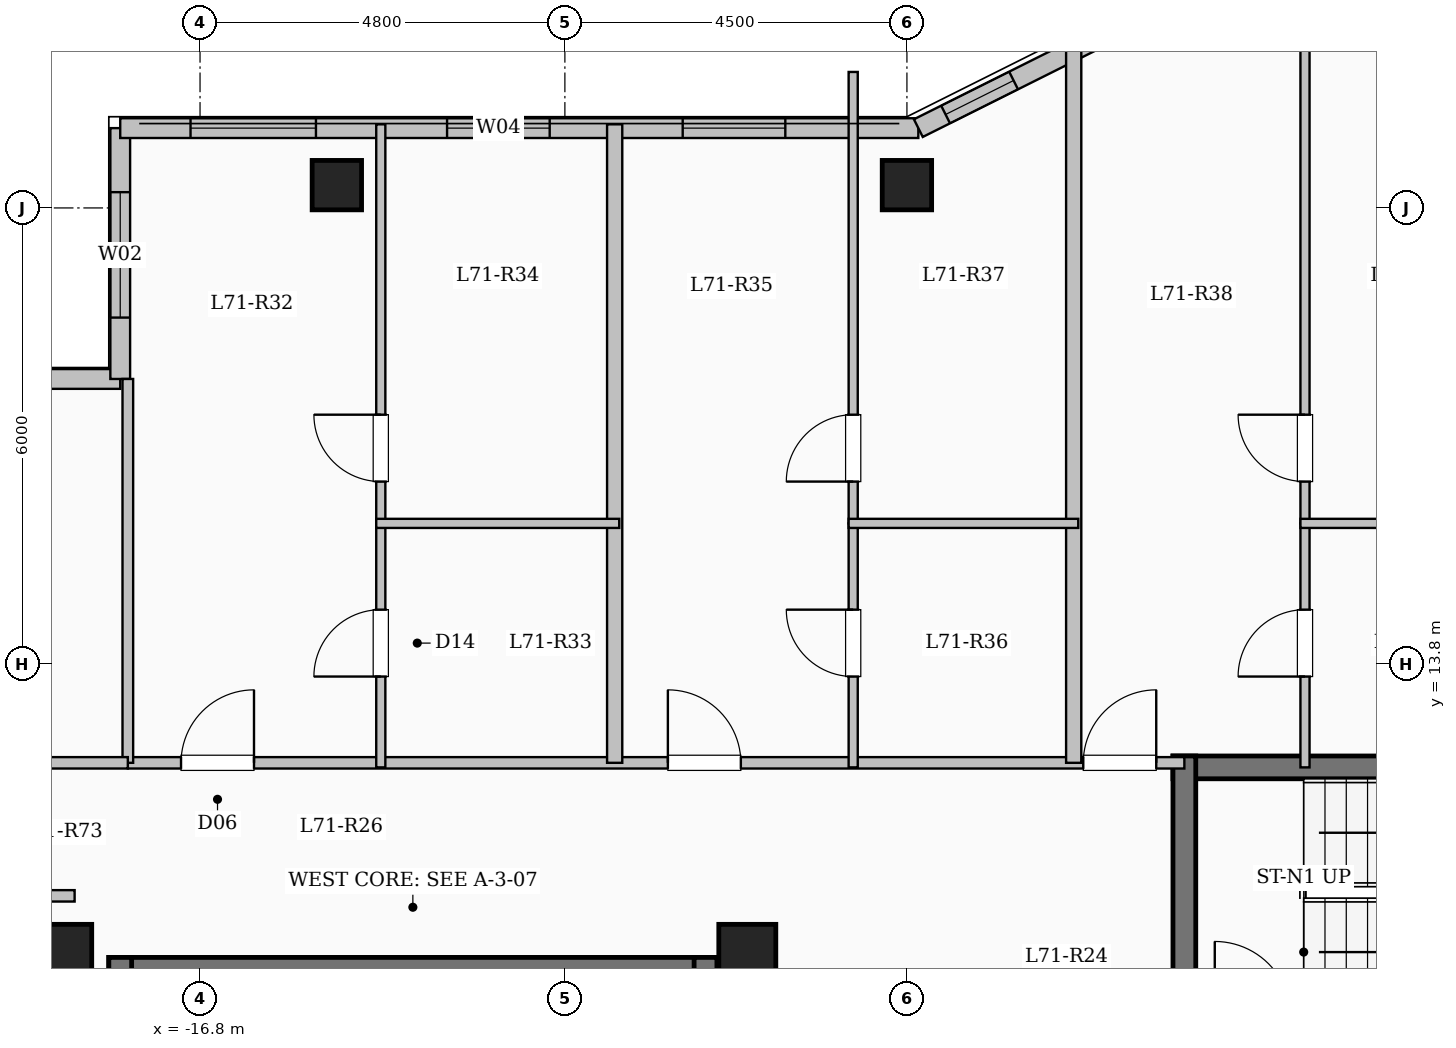
"""IFC4 building model, lengths in metres.
Left out: names, types, materials, properties, quantities, classifications, styles, units other than length and angle.
Written with IfcOpenShell. Run it as: python <this file> out.ifc"""

import sys

from ifc_helpers import new_model, si_unit, direction, frame, frame_2d, origin, origin_2d, place, context, subcontext, project, spatial, rectangle, extrude, element, fill, save


model = new_model("IFC4")
c1 = context("Model", 3, precision=1e-05, world=origin(), true_north=direction((0.0, 1.0)))
c2 = subcontext(c1, "Body", "Model", "MODEL_VIEW")
j1 = project(units=[si_unit("LENGTHUNIT", "METRE"), si_unit("PLANEANGLEUNIT", "RADIAN")], contexts=[c1])
p1 = place(None, origin())
s1 = spatial("IfcSite", under=j1, at=p1, CompositionType="ELEMENT")
p2 = place(p1, origin())
s2 = spatial("IfcBuilding", under=s1, at=p2, CompositionType="ELEMENT")
p3 = place(p2, frame((0.0, 0.0, 261.6)))
s3 = spatial("IfcBuildingStorey", under=s2, at=p3, CompositionType="ELEMENT", Elevation=261.6)
for number, where, z_axis, x_axis in (
    (1, (-9.6, 10.0, 0.0), (0.0, 0.0, 1.0), (1.0, 0.0, 0.0)),
    (2, (-18.6, 10.0, 0.0), (0.0, 0.0, 1.0), (1.0, 0.0, 0.0)),
):
    element("IfcColumn", number, at=place(p3, frame(where, z_axis=z_axis, x_axis=x_axis)), inside=s3, PredefinedType="COLUMN", context=c2, shape_type="SweptSolid", body=[
        extrude(rectangle(XDim=0.75, YDim=0.75, at=origin_2d()), origin(), (0.0, 0.0, 1.0), 3.35),
    ])
for number, where, z_axis, x_axis in (
    (3, (-15.0, 20.1, 0.0), (0.0, 0.0, 1.0), (1.0, 0.0, 0.0)),
    (4, (-7.5, 20.1, 0.0), (0.0, 0.0, 1.0), (1.0, 0.0, 0.0)),
):
    element("IfcColumn", number, at=place(p3, frame(where, z_axis=z_axis, x_axis=x_axis)), inside=s3, PredefinedType="COLUMN", context=c2, shape_type="SweptSolid", body=[
        extrude(rectangle(XDim=0.65, YDim=0.65, at=origin_2d()), origin(), (0.0, 0.0, 1.0), 3.35),
    ])
p4 = place(p3, frame((-22.65, 17.55, 0.0), z_axis=(0.0, 0.0, 1.0), x_axis=(1.0, 0.0, 0.0)))
e5 = element("IfcWall", 5, at=p4, inside=s3, PredefinedType="SOLIDWALL", context=c2, shape_type="SweptSolid", body=[
    extrude(rectangle(XDim=4.8, YDim=0.26, at=frame_2d((2.4, 0.0))), origin(), (0.0, 0.0, 1.0), 3.1),
])
p5 = place(p4, frame((1.425, 0.0, 0.9)))
e6 = element("IfcOpeningElement", 6, at=p5, cuts=e5, PredefinedType="OPENING", context=c2, shape_type="SweptSolid", body=[
    extrude(rectangle(XDim=2.0, YDim=1.7, at=frame_2d((1.0, 0.85))), frame((0.0, 0.14, 0.0), z_axis=(0.0, -1.0, 0.0), x_axis=(1.0, 0.0, 0.0)), (0.0, 0.0, 1.0), 0.28),
])
p6 = place(p3, frame((-17.85, 17.55, 0.0), z_axis=(0.0, 0.0, 1.0), x_axis=(0.0, 1.0, 0.0)))
e7 = element("IfcWall", 7, at=p6, inside=s3, PredefinedType="SOLIDWALL", context=c2, shape_type="SweptSolid", body=[
    extrude(rectangle(XDim=3.3, YDim=0.26, at=frame_2d((1.65, 0.0))), origin(), (0.0, 0.0, 1.0), 3.1),
])
p7 = place(p6, frame((0.808, 0.0, 0.9)))
e8 = element("IfcOpeningElement", 8, at=p7, cuts=e7, PredefinedType="OPENING", context=c2, shape_type="SweptSolid", body=[
    extrude(rectangle(XDim=1.65, YDim=1.6, at=frame_2d((0.825, 0.8))), frame((0.0, 0.14, 0.0), z_axis=(0.0, -1.0, 0.0), x_axis=(1.0, 0.0, 0.0)), (0.0, 0.0, 1.0), 0.28),
])
p8 = place(p3, frame((-17.85, 20.85, 0.0), z_axis=(0.0, 0.0, 1.0), x_axis=(1.0, 0.0, 0.0)))
e9 = element("IfcWall", 9, at=p8, inside=s3, PredefinedType="SOLIDWALL", context=c2, shape_type="SweptSolid", body=[
    extrude(rectangle(XDim=10.5, YDim=0.26, at=frame_2d((5.25, 0.0))), origin(), (0.0, 0.0, 1.0), 3.1),
])
p9 = place(p8, frame((0.925, 0.0, 0.9)))
e10 = element("IfcOpeningElement", 10, at=p9, cuts=e9, PredefinedType="OPENING", context=c2, shape_type="SweptSolid", body=[
    extrude(rectangle(XDim=1.65, YDim=1.6, at=frame_2d((0.825, 0.8))), frame((0.0, 0.14, 0.0), z_axis=(0.0, -1.0, 0.0), x_axis=(1.0, 0.0, 0.0)), (0.0, 0.0, 1.0), 0.28),
])
p10 = place(p8, frame((4.3, 0.0, 0.95)))
e11 = element("IfcOpeningElement", 11, at=p10, cuts=e9, PredefinedType="OPENING", context=c2, shape_type="SweptSolid", body=[
    extrude(rectangle(XDim=1.35, YDim=1.55, at=frame_2d((0.675, 0.775))), frame((0.0, 0.14, 0.0), z_axis=(0.0, -1.0, 0.0), x_axis=(1.0, 0.0, 0.0)), (0.0, 0.0, 1.0), 0.28),
])
p11 = place(p8, frame((7.4, 0.0, 0.95)))
e12 = element("IfcOpeningElement", 12, at=p11, cuts=e9, PredefinedType="OPENING", context=c2, shape_type="SweptSolid", body=[
    extrude(rectangle(XDim=1.35, YDim=1.55, at=frame_2d((0.675, 0.775))), frame((0.0, 0.14, 0.0), z_axis=(0.0, -1.0, 0.0), x_axis=(1.0, 0.0, 0.0)), (0.0, 0.0, 1.0), 0.28),
])
p12 = place(p3, frame((-7.35, 20.85, 0.0), z_axis=(0.0, 0.0, 1.0), x_axis=(0.894427191, 0.4472135955, 0.0)))
e13 = element("IfcWall", 13, at=p12, inside=s3, PredefinedType="SOLIDWALL", context=c2, shape_type="SweptSolid", body=[
    extrude(rectangle(XDim=3.354, YDim=0.26, at=frame_2d((1.677, 0.0))), origin(), (0.0, 0.0, 1.0), 3.1),
])
p13 = place(p12, frame((0.401, 0.0, 0.95)))
e14 = element("IfcOpeningElement", 14, at=p13, cuts=e13, PredefinedType="OPENING", context=c2, shape_type="SweptSolid", body=[
    extrude(rectangle(XDim=1.0, YDim=1.5, at=frame_2d((0.5, 0.75))), frame((0.0, 0.14, 0.0), z_axis=(0.0, -1.0, 0.0), x_axis=(1.0, 0.0, 0.0)), (0.0, 0.0, 1.0), 0.28),
])
p14 = place(p3, frame((-18.0, 9.79, 0.0), z_axis=(0.0, 0.0, 1.0), x_axis=(1.0, 0.0, 0.0)))
e15 = element("IfcWall", 15, at=p14, inside=s3, PredefinedType="SHEAR", context=c2, shape_type="SweptSolid", body=[
    extrude(rectangle(XDim=8.0, YDim=0.3, at=frame_2d((4.0, 0.0))), origin(), (0.0, 0.0, 1.0), 3.35),
])
for number, where, z_axis, x_axis in (
    (16, (-17.85, 6.35, 0.0), (0.0, 0.0, 1.0), (0.0, 1.0, 0.0)),
    (17, (-10.15, 6.35, 0.0), (0.0, 0.0, 1.0), (0.0, 1.0, 0.0)),
):
    element("IfcWall", number, at=place(p3, frame(where, z_axis=z_axis, x_axis=x_axis)), inside=s3, PredefinedType="SHEAR", context=c2, shape_type="SweptSolid", body=[
        extrude(rectangle(XDim=3.59, YDim=0.3, at=frame_2d((1.795, 0.0))), origin(), (0.0, 0.0, 1.0), 3.35),
    ])
p15 = place(p3, frame((-4.0, 12.44, 0.0), z_axis=(0.0, 0.0, 1.0), x_axis=(1.0, 0.0, 0.0)))
e18 = element("IfcWall", 18, at=p15, inside=s3, PredefinedType="SHEAR", context=c2, shape_type="SweptSolid", body=[
    extrude(rectangle(XDim=8.0, YDim=0.3, at=frame_2d((4.0, 0.0))), origin(), (0.0, 0.0, 1.0), 3.35),
])
p16 = place(p3, frame((-3.85, 9.0, 0.0), z_axis=(0.0, 0.0, 1.0), x_axis=(0.0, 1.0, 0.0)))
e19 = element("IfcWall", 19, at=p16, inside=s3, PredefinedType="SHEAR", context=c2, shape_type="SweptSolid", body=[
    extrude(rectangle(XDim=3.59, YDim=0.3, at=frame_2d((1.795, 0.0))), origin(), (0.0, 0.0, 1.0), 3.35),
])
p17 = place(p3, frame((-17.75, 12.5, 0.0), z_axis=(0.0, 0.0, 1.0), x_axis=(1.0, 0.0, 0.0)))
e20 = element("IfcWall", 20, at=p17, inside=s3, PredefinedType="PARTITIONING", context=c2, shape_type="SweptSolid", body=[
    extrude(rectangle(XDim=13.9, YDim=0.15, at=frame_2d((6.95, 0.0))), origin(), (0.0, 0.0, 1.0), 3.1),
])
p18 = place(p17, frame((0.7, 0.0, 0.0)))
e21 = element("IfcOpeningElement", 21, at=p18, cuts=e20, PredefinedType="OPENING", context=c2, shape_type="SweptSolid", body=[
    extrude(rectangle(XDim=0.96, YDim=2.15, at=frame_2d((0.48, 1.075))), frame((0.0, 0.085, 0.0), z_axis=(0.0, -1.0, 0.0), x_axis=(1.0, 0.0, 0.0)), (0.0, 0.0, 1.0), 0.17),
])
p19 = place(p17, frame((7.105, 0.0, 0.0)))
e22 = element("IfcOpeningElement", 22, at=p19, cuts=e20, PredefinedType="OPENING", context=c2, shape_type="SweptSolid", body=[
    extrude(rectangle(XDim=0.96, YDim=2.15, at=frame_2d((0.48, 1.075))), frame((0.0, 0.085, 0.0), z_axis=(0.0, -1.0, 0.0), x_axis=(1.0, 0.0, 0.0)), (0.0, 0.0, 1.0), 0.17),
])
p20 = place(p17, frame((12.57, 0.0, 0.0)))
e23 = element("IfcOpeningElement", 23, at=p20, cuts=e20, PredefinedType="OPENING", context=c2, shape_type="SweptSolid", body=[
    extrude(rectangle(XDim=0.96, YDim=2.15, at=frame_2d((0.48, 1.075))), frame((0.0, 0.085, 0.0), z_axis=(0.0, -1.0, 0.0), x_axis=(1.0, 0.0, 0.0)), (0.0, 0.0, 1.0), 0.17),
])
p21 = place(p3, frame((-11.345, 12.5, 0.0), z_axis=(0.0, 0.0, 1.0), x_axis=(0.0, 1.0, 0.0)))
e24 = element("IfcWall", 24, at=p21, inside=s3, PredefinedType="SOLIDWALL", context=c2, shape_type="SweptSolid", body=[
    extrude(rectangle(XDim=8.4, YDim=0.2, at=frame_2d((4.2, 0.0))), origin(), (0.0, 0.0, 1.0), 3.1),
])
p22 = place(p3, frame((-14.422, 12.44, 0.0), z_axis=(0.0, 0.0, 1.0), x_axis=(0.0, 1.0, 0.0)))
e25 = element("IfcWall", 25, at=p22, inside=s3, PredefinedType="PARTITIONING", context=c2, shape_type="SweptSolid", body=[
    extrude(rectangle(XDim=3.21, YDim=0.12, at=frame_2d((1.605, 0.0))), origin(), (0.0, 0.0, 1.0), 3.1),
])
p23 = place(p22, frame((1.195, 0.0, 0.0)))
e26 = element("IfcOpeningElement", 26, at=p23, cuts=e25, PredefinedType="OPENING", context=c2, shape_type="SweptSolid", body=[
    extrude(rectangle(XDim=0.88, YDim=2.1, at=frame_2d((0.44, 1.05))), frame((0.0, 0.07, 0.0), z_axis=(0.0, -1.0, 0.0), x_axis=(1.0, 0.0, 0.0)), (0.0, 0.0, 1.0), 0.14),
])
p24 = place(p3, frame((-14.422, 15.65, 0.0), z_axis=(0.0, 0.0, 1.0), x_axis=(0.0, 1.0, 0.0)))
e27 = element("IfcWall", 27, at=p24, inside=s3, PredefinedType="PARTITIONING", context=c2, shape_type="SweptSolid", body=[
    extrude(rectangle(XDim=5.25, YDim=0.12, at=frame_2d((2.625, 0.0))), origin(), (0.0, 0.0, 1.0), 3.1),
])
p25 = place(p24, frame((0.55, 0.0, 0.0)))
e28 = element("IfcOpeningElement", 28, at=p25, cuts=e27, PredefinedType="OPENING", context=c2, shape_type="SweptSolid", body=[
    extrude(rectangle(XDim=0.88, YDim=2.1, at=frame_2d((0.44, 1.05))), frame((0.0, 0.07, 0.0), z_axis=(0.0, -1.0, 0.0), x_axis=(1.0, 0.0, 0.0)), (0.0, 0.0, 1.0), 0.14),
])
p26 = place(p3, frame((-14.482, 15.65, 0.0), z_axis=(0.0, 0.0, 1.0), x_axis=(1.0, 0.0, 0.0)))
e29 = element("IfcWall", 29, at=p26, inside=s3, PredefinedType="PARTITIONING", context=c2, shape_type="SweptSolid", body=[
    extrude(rectangle(XDim=3.197, YDim=0.12, at=frame_2d((1.599, 0.0))), origin(), (0.0, 0.0, 1.0), 2.785),
])
p27 = place(p3, frame((-5.306, 12.5, 0.0), z_axis=(0.0, 0.0, 1.0), x_axis=(0.0, 1.0, 0.0)))
e30 = element("IfcWall", 30, at=p27, inside=s3, PredefinedType="SOLIDWALL", context=c2, shape_type="SweptSolid", body=[
    extrude(rectangle(XDim=9.805, YDim=0.2, at=frame_2d((4.902, 0.0))), origin(), (0.0, 0.0, 1.0), 3.1),
])
p28 = place(p3, frame((-8.207, 12.44, 0.0), z_axis=(0.0, 0.0, 1.0), x_axis=(0.0, 1.0, 0.0)))
e31 = element("IfcWall", 31, at=p28, inside=s3, PredefinedType="PARTITIONING", context=c2, shape_type="SweptSolid", body=[
    extrude(rectangle(XDim=3.21, YDim=0.12, at=frame_2d((1.605, 0.0))), origin(), (0.0, 0.0, 1.0), 3.1),
])
p29 = place(p28, frame((1.195, 0.0, 0.0)))
e32 = element("IfcOpeningElement", 32, at=p29, cuts=e31, PredefinedType="OPENING", context=c2, shape_type="SweptSolid", body=[
    extrude(rectangle(XDim=0.88, YDim=2.1, at=frame_2d((0.44, 1.05))), frame((0.0, 0.07, 0.0), z_axis=(0.0, -1.0, 0.0), x_axis=(1.0, 0.0, 0.0)), (0.0, 0.0, 1.0), 0.14),
])
p30 = place(p3, frame((-8.207, 15.65, 0.0), z_axis=(0.0, 0.0, 1.0), x_axis=(0.0, 1.0, 0.0)))
e33 = element("IfcWall", 33, at=p30, inside=s3, PredefinedType="PARTITIONING", context=c2, shape_type="SweptSolid", body=[
    extrude(rectangle(XDim=5.939, YDim=0.12, at=frame_2d((2.97, 0.0))), origin(), (0.0, 0.0, 1.0), 3.1),
])
p31 = place(p30, frame((0.55, 0.0, 0.0)))
e34 = element("IfcOpeningElement", 34, at=p31, cuts=e33, PredefinedType="OPENING", context=c2, shape_type="SweptSolid", body=[
    extrude(rectangle(XDim=0.88, YDim=2.1, at=frame_2d((0.44, 1.05))), frame((0.0, 0.07, 0.0), z_axis=(0.0, -1.0, 0.0), x_axis=(1.0, 0.0, 0.0)), (0.0, 0.0, 1.0), 0.14),
])
p32 = place(p3, frame((-8.267, 15.65, 0.0), z_axis=(0.0, 0.0, 1.0), x_axis=(1.0, 0.0, 0.0)))
e35 = element("IfcWall", 35, at=p32, inside=s3, PredefinedType="PARTITIONING", context=c2, shape_type="SweptSolid", body=[
    extrude(rectangle(XDim=3.021, YDim=0.12, at=frame_2d((1.51, 0.0))), origin(), (0.0, 0.0, 1.0), 2.785),
])
p33 = place(p3, frame((-2.263, 12.44, 0.0), z_axis=(0.0, 0.0, 1.0), x_axis=(0.0, 1.0, 0.0)))
e36 = element("IfcWall", 36, at=p33, inside=s3, PredefinedType="PARTITIONING", context=c2, shape_type="SweptSolid", body=[
    extrude(rectangle(XDim=3.21, YDim=0.12, at=frame_2d((1.605, 0.0))), origin(), (0.0, 0.0, 1.0), 3.1),
])
p34 = place(p33, frame((1.195, 0.0, 0.0)))
e37 = element("IfcOpeningElement", 37, at=p34, cuts=e36, PredefinedType="OPENING", context=c2, shape_type="SweptSolid", body=[
    extrude(rectangle(XDim=0.88, YDim=2.1, at=frame_2d((0.44, 1.05))), frame((0.0, 0.07, 0.0), z_axis=(0.0, -1.0, 0.0), x_axis=(1.0, 0.0, 0.0)), (0.0, 0.0, 1.0), 0.14),
])
p35 = place(p3, frame((-2.263, 15.65, 0.0), z_axis=(0.0, 0.0, 1.0), x_axis=(0.0, 1.0, 0.0)))
e38 = element("IfcWall", 38, at=p35, inside=s3, PredefinedType="PARTITIONING", context=c2, shape_type="SweptSolid", body=[
    extrude(rectangle(XDim=6.73, YDim=0.12, at=frame_2d((3.365, 0.0))), origin(), (0.0, 0.0, 1.0), 3.1),
])
p36 = place(p35, frame((0.55, 0.0, 0.0)))
e39 = element("IfcOpeningElement", 39, at=p36, cuts=e38, PredefinedType="OPENING", context=c2, shape_type="SweptSolid", body=[
    extrude(rectangle(XDim=0.88, YDim=2.1, at=frame_2d((0.44, 1.05))), frame((0.0, 0.07, 0.0), z_axis=(0.0, -1.0, 0.0), x_axis=(1.0, 0.0, 0.0)), (0.0, 0.0, 1.0), 0.14),
])
p37 = place(p3, frame((-2.323, 15.65, 0.0), z_axis=(0.0, 0.0, 1.0), x_axis=(1.0, 0.0, 0.0)))
e40 = element("IfcWall", 40, at=p37, inside=s3, PredefinedType="PARTITIONING", context=c2, shape_type="SweptSolid", body=[
    extrude(rectangle(XDim=2.933, YDim=0.12, at=frame_2d((1.467, 0.0))), origin(), (0.0, 0.0, 1.0), 2.785),
])
p38 = place(p3, frame((-22.68, 10.75, 0.0), z_axis=(0.0, 0.0, 1.0), x_axis=(1.0, 0.0, 0.0)))
e41 = element("IfcWall", 41, at=p38, inside=s3, PredefinedType="PARTITIONING", context=c2, shape_type="SweptSolid", body=[
    extrude(rectangle(XDim=4.23, YDim=0.15, at=frame_2d((2.115, 0.0))), origin(), (0.0, 0.0, 1.0), 3.1),
])
p39 = place(p3, frame((-17.75, 12.5, 0.0), z_axis=(0.0, 0.0, 1.0), x_axis=(0.0, 1.0, 0.0)))
e42 = element("IfcWall", 42, at=p39, inside=s3, PredefinedType="PARTITIONING", context=c2, shape_type="SweptSolid", body=[
    extrude(rectangle(XDim=5.05, YDim=0.14, at=frame_2d((2.525, 0.0))), origin(), (0.0, 0.0, 1.0), 3.1),
])
p40 = place(p3, frame((-22.68, 12.5, 0.0), z_axis=(0.0, 0.0, 1.0), x_axis=(1.0, 0.0, 0.0)))
e43 = element("IfcWall", 43, at=p40, inside=s3, PredefinedType="PARTITIONING", context=c2, shape_type="SweptSolid", body=[
    extrude(rectangle(XDim=4.93, YDim=0.15, at=frame_2d((2.465, 0.0))), origin(), (0.0, 0.0, 1.0), 3.1),
])
p41 = place(p40, frame((1.99, 0.0, 0.0)))
e44 = element("IfcOpeningElement", 44, at=p41, cuts=e43, PredefinedType="OPENING", context=c2, shape_type="SweptSolid", body=[
    extrude(rectangle(XDim=0.95, YDim=2.15, at=frame_2d((0.475, 1.075))), frame((0.0, 0.085, 0.0), z_axis=(0.0, -1.0, 0.0), x_axis=(1.0, 0.0, 0.0)), (0.0, 0.0, 1.0), 0.17),
])
p42 = place(p7, origin())
e45 = element("IfcWindow", 45, at=p42, inside=s3, PartitioningType="SINGLE_PANEL", PredefinedType="WINDOW", context=c2, shape_type="SweptSolid", body=[
    extrude(rectangle(XDim=1.65, YDim=1.6, at=frame_2d((0.825, 0.8))), frame((0.0, 0.03, 0.0), z_axis=(0.0, -1.0, 0.0), x_axis=(1.0, 0.0, 0.0)), (0.0, 0.0, 1.0), 0.06),
])
fill(e8, e45)
p43 = place(p9, origin())
e46 = element("IfcWindow", 46, at=p43, inside=s3, PartitioningType="SINGLE_PANEL", PredefinedType="WINDOW", context=c2, shape_type="SweptSolid", body=[
    extrude(rectangle(XDim=1.65, YDim=1.6, at=frame_2d((0.825, 0.8))), frame((0.0, 0.03, 0.0), z_axis=(0.0, -1.0, 0.0), x_axis=(1.0, 0.0, 0.0)), (0.0, 0.0, 1.0), 0.06),
])
fill(e10, e46)
p44 = place(p10, origin())
e47 = element("IfcWindow", 47, at=p44, inside=s3, PartitioningType="SINGLE_PANEL", PredefinedType="WINDOW", context=c2, shape_type="SweptSolid", body=[
    extrude(rectangle(XDim=1.35, YDim=1.55, at=frame_2d((0.675, 0.775))), frame((0.0, 0.03, 0.0), z_axis=(0.0, -1.0, 0.0), x_axis=(1.0, 0.0, 0.0)), (0.0, 0.0, 1.0), 0.06),
])
fill(e11, e47)
p45 = place(p11, origin())
e48 = element("IfcWindow", 48, at=p45, inside=s3, PartitioningType="SINGLE_PANEL", PredefinedType="WINDOW", context=c2, shape_type="SweptSolid", body=[
    extrude(rectangle(XDim=1.35, YDim=1.55, at=frame_2d((0.675, 0.775))), frame((0.0, 0.03, 0.0), z_axis=(0.0, -1.0, 0.0), x_axis=(1.0, 0.0, 0.0)), (0.0, 0.0, 1.0), 0.06),
])
fill(e12, e48)
p46 = place(p13, origin())
e49 = element("IfcWindow", 49, at=p46, inside=s3, PartitioningType="SINGLE_PANEL", PredefinedType="WINDOW", context=c2, shape_type="SweptSolid", body=[
    extrude(rectangle(XDim=1.0, YDim=1.5, at=frame_2d((0.5, 0.75))), frame((0.0, 0.03, 0.0), z_axis=(0.0, -1.0, 0.0), x_axis=(1.0, 0.0, 0.0)), (0.0, 0.0, 1.0), 0.06),
])
fill(e14, e49)
p47 = place(p18, origin())
e50 = element("IfcDoor", 50, at=p47, inside=s3, OperationType="SINGLE_SWING_RIGHT", PredefinedType="DOOR", context=c2, shape_type="SweptSolid", body=[
    extrude(rectangle(XDim=0.96, YDim=2.15, at=frame_2d((0.48, 1.075))), frame((0.0, 0.025, 0.0), z_axis=(0.0, -1.0, 0.0), x_axis=(1.0, 0.0, 0.0)), (0.0, 0.0, 1.0), 0.05),
])
fill(e21, e50)
p48 = place(p23, origin())
e51 = element("IfcDoor", 51, at=p48, inside=s3, OperationType="SINGLE_SWING_LEFT", PredefinedType="DOOR", context=c2, shape_type="SweptSolid", body=[
    extrude(rectangle(XDim=0.88, YDim=2.1, at=frame_2d((0.44, 1.05))), frame((0.0, 0.025, 0.0), z_axis=(0.0, -1.0, 0.0), x_axis=(1.0, 0.0, 0.0)), (0.0, 0.0, 1.0), 0.05),
])
fill(e26, e51)
p49 = place(p25, origin())
e52 = element("IfcDoor", 52, at=p49, inside=s3, OperationType="SINGLE_SWING_RIGHT", PredefinedType="DOOR", context=c2, shape_type="SweptSolid", body=[
    extrude(rectangle(XDim=0.88, YDim=2.1, at=frame_2d((0.44, 1.05))), frame((0.0, 0.025, 0.0), z_axis=(0.0, -1.0, 0.0), x_axis=(1.0, 0.0, 0.0)), (0.0, 0.0, 1.0), 0.05),
])
fill(e28, e52)
p50 = place(p19, origin())
e53 = element("IfcDoor", 53, at=p50, inside=s3, OperationType="SINGLE_SWING_LEFT", PredefinedType="DOOR", context=c2, shape_type="SweptSolid", body=[
    extrude(rectangle(XDim=0.96, YDim=2.15, at=frame_2d((0.48, 1.075))), frame((0.0, 0.025, 0.0), z_axis=(0.0, -1.0, 0.0), x_axis=(1.0, 0.0, 0.0)), (0.0, 0.0, 1.0), 0.05),
])
fill(e22, e53)
p51 = place(p29, origin())
e54 = element("IfcDoor", 54, at=p51, inside=s3, OperationType="SINGLE_SWING_RIGHT", PredefinedType="DOOR", context=c2, shape_type="SweptSolid", body=[
    extrude(rectangle(XDim=0.88, YDim=2.1, at=frame_2d((0.44, 1.05))), frame((0.0, 0.025, 0.0), z_axis=(0.0, -1.0, 0.0), x_axis=(1.0, 0.0, 0.0)), (0.0, 0.0, 1.0), 0.05),
])
fill(e32, e54)
p52 = place(p31, origin())
e55 = element("IfcDoor", 55, at=p52, inside=s3, OperationType="SINGLE_SWING_LEFT", PredefinedType="DOOR", context=c2, shape_type="SweptSolid", body=[
    extrude(rectangle(XDim=0.88, YDim=2.1, at=frame_2d((0.44, 1.05))), frame((0.0, 0.025, 0.0), z_axis=(0.0, -1.0, 0.0), x_axis=(1.0, 0.0, 0.0)), (0.0, 0.0, 1.0), 0.05),
])
fill(e34, e55)
p53 = place(p20, origin())
e56 = element("IfcDoor", 56, at=p53, inside=s3, OperationType="SINGLE_SWING_RIGHT", PredefinedType="DOOR", context=c2, shape_type="SweptSolid", body=[
    extrude(rectangle(XDim=0.96, YDim=2.15, at=frame_2d((0.48, 1.075))), frame((0.0, 0.025, 0.0), z_axis=(0.0, -1.0, 0.0), x_axis=(1.0, 0.0, 0.0)), (0.0, 0.0, 1.0), 0.05),
])
fill(e23, e56)
p54 = place(p34, origin())
e57 = element("IfcDoor", 57, at=p54, inside=s3, OperationType="SINGLE_SWING_LEFT", PredefinedType="DOOR", context=c2, shape_type="SweptSolid", body=[
    extrude(rectangle(XDim=0.88, YDim=2.1, at=frame_2d((0.44, 1.05))), frame((0.0, 0.025, 0.0), z_axis=(0.0, -1.0, 0.0), x_axis=(1.0, 0.0, 0.0)), (0.0, 0.0, 1.0), 0.05),
])
fill(e37, e57)
p55 = place(p36, origin())
e58 = element("IfcDoor", 58, at=p55, inside=s3, OperationType="SINGLE_SWING_RIGHT", PredefinedType="DOOR", context=c2, shape_type="SweptSolid", body=[
    extrude(rectangle(XDim=0.88, YDim=2.1, at=frame_2d((0.44, 1.05))), frame((0.0, 0.025, 0.0), z_axis=(0.0, -1.0, 0.0), x_axis=(1.0, 0.0, 0.0)), (0.0, 0.0, 1.0), 0.05),
])
fill(e39, e58)
save(model, sys.argv[1])
